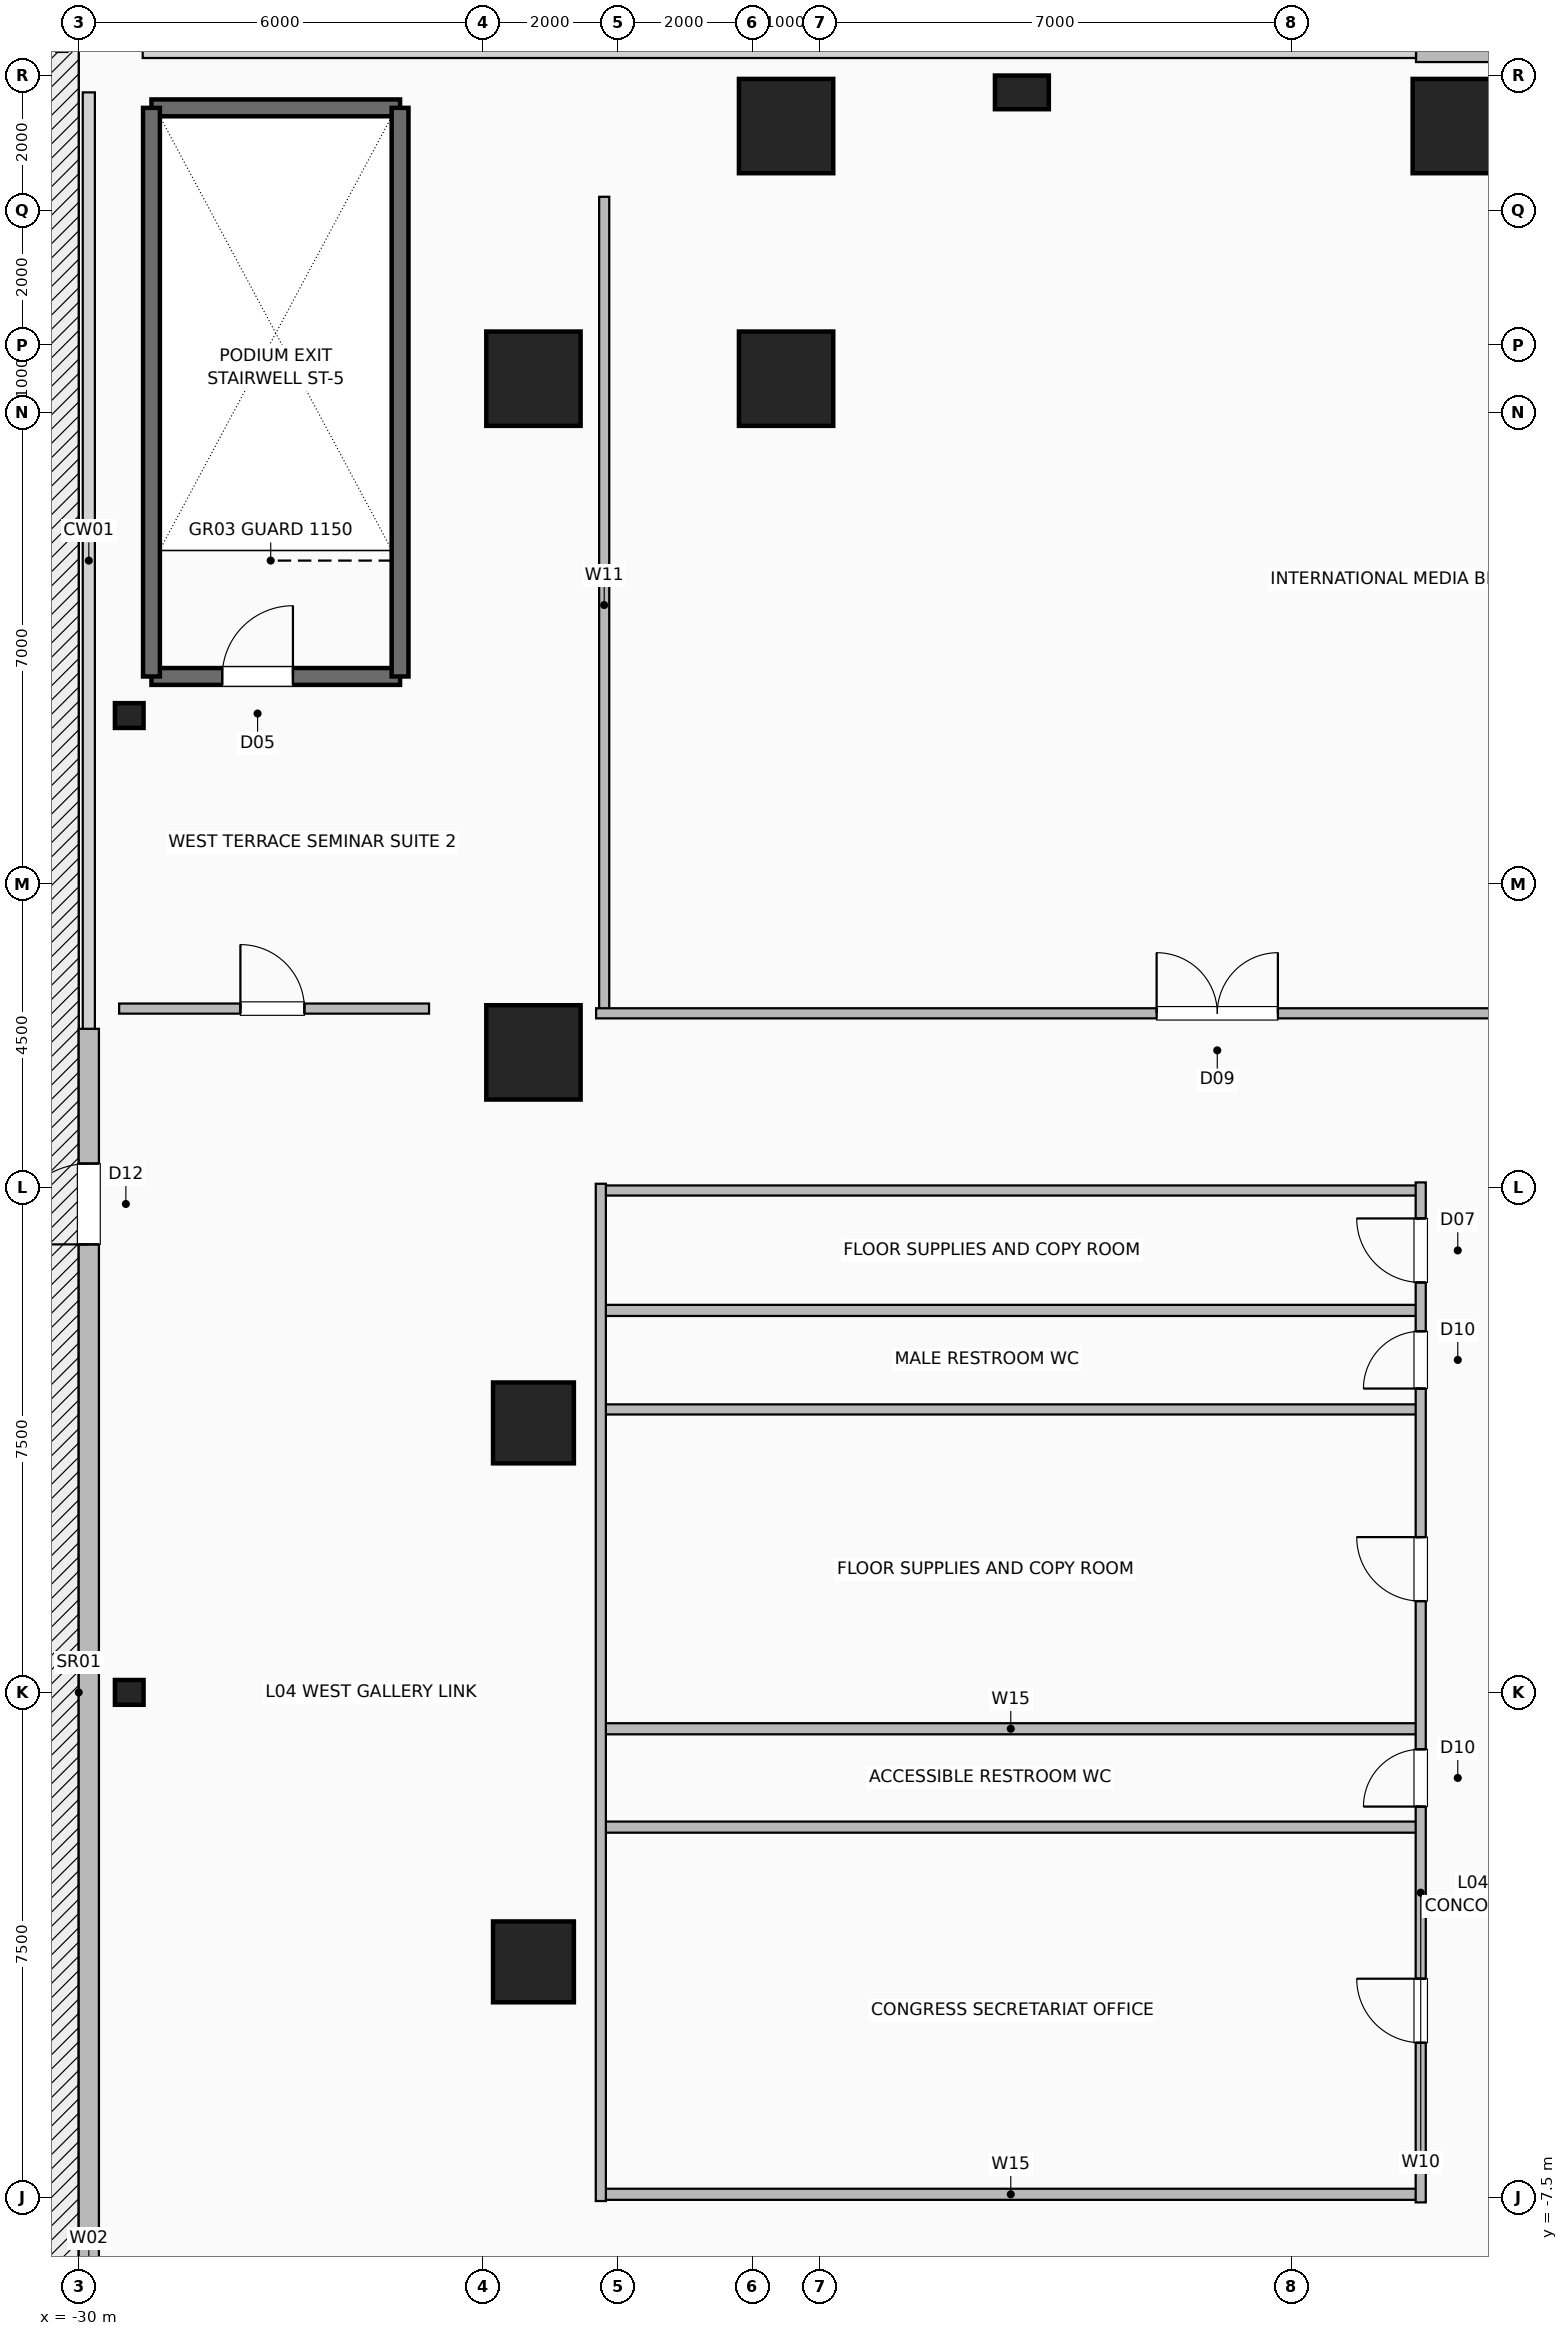
"""IFC4 building model, lengths in metres.
Left out: names, types, materials, properties, quantities, classifications, styles, units other than length and angle.
Written with IfcOpenShell. Run it as: python <this file> out.ifc"""

import sys

from ifc_helpers import new_model, si_unit, direction, frame, frame_2d, origin, origin_2d, place, context, subcontext, project, spatial, rectangle, hollow_rectangle, i_section, extrude, element, fill, save


model = new_model("IFC4")
c1 = context("Model", 3, precision=1e-05, world=origin(), true_north=direction((0.0, 1.0)))
c2 = subcontext(c1, "Body", "Model", "MODEL_VIEW")
j1 = project(units=[si_unit("LENGTHUNIT", "METRE"), si_unit("PLANEANGLEUNIT", "RADIAN")], contexts=[c1])
p1 = place(None, origin())
s1 = spatial("IfcSite", under=j1, at=p1, CompositionType="ELEMENT")
p2 = place(p1, origin())
s2 = spatial("IfcBuilding", under=s1, at=p2, CompositionType="ELEMENT")
p3 = place(p2, frame((0.0, 0.0, 21.6)))
s3 = spatial("IfcBuildingStorey", under=s2, at=p3, CompositionType="ELEMENT", Elevation=21.6)
p4 = place(p3, frame((-19.5, 23.25, 0.0), z_axis=(0.0, 0.0, 1.0), x_axis=(1.0, 0.0, 0.0)))
e1 = element("IfcColumn", 1, at=p4, inside=s3, PredefinedType="COLUMN", context=c2, shape_type="SweptSolid", body=[
    extrude(hollow_rectangle(XDim=1.4, YDim=1.4, WallThickness=0.06, at=origin_2d()), origin(), (0.0, 0.0, 1.0), 5.4),
])
for number, where, z_axis, x_axis in (
    (2, (-9.5, 23.25, 0.0), (0.0, 0.0, 1.0), (1.0, 0.0, 0.0)),
    (3, (-23.25, 9.5, 0.0), (0.0, 0.0, 1.0), (1.0, 0.0, 0.0)),
):
    element("IfcColumn", number, at=place(p3, frame(where, z_axis=z_axis, x_axis=x_axis)), inside=s3, PredefinedType="COLUMN", context=c2, shape_type="SweptSolid", body=[
        extrude(hollow_rectangle(XDim=1.4, YDim=1.4, WallThickness=0.06, at=origin_2d()), origin(), (0.0, 0.0, 1.0), 5.0),
    ])
for number, where, z_axis, x_axis in (
    (4, (-23.25, 19.5, 0.0), (0.0, 0.0, 1.0), (1.0, 0.0, 0.0)),
    (5, (-19.5, 19.5, 0.0), (0.0, 0.0, 1.0), (1.0, 0.0, 0.0)),
):
    element("IfcColumn", number, at=place(p3, frame(where, z_axis=z_axis, x_axis=x_axis)), inside=s3, PredefinedType="COLUMN", context=c2, shape_type="SweptSolid", body=[
        extrude(hollow_rectangle(XDim=1.4, YDim=1.4, WallThickness=0.06, at=origin_2d()), origin(), (0.0, 0.0, 1.0), 5.4),
    ])
for number, where, z_axis, x_axis in (
    (6, (-23.25, -4.0, -0.4), (0.0, 0.0, 1.0), (1.0, 0.0, 0.0)),
    (7, (-23.25, 4.0, -0.4), (0.0, 0.0, 1.0), (1.0, 0.0, 0.0)),
):
    element("IfcColumn", number, at=place(p3, frame(where, z_axis=z_axis, x_axis=x_axis)), inside=s3, PredefinedType="COLUMN", context=c2, shape_type="SweptSolid", body=[
        extrude(hollow_rectangle(XDim=1.2, YDim=1.2, WallThickness=0.055, at=origin_2d()), origin(), (0.0, 0.0, 1.0), 5.8),
    ])
for number, where, z_axis, x_axis in (
    (8, (-29.25, 0.0, 0.0), (0.0, 0.0, 1.0), (1.0, 0.0, 0.0)),
    (9, (-29.25, 14.5, 0.0), (0.0, 0.0, 1.0), (1.0, 0.0, 0.0)),
):
    element("IfcColumn", number, at=place(p3, frame(where, z_axis=z_axis, x_axis=x_axis)), inside=s3, PredefinedType="COLUMN", context=c2, shape_type="SweptSolid", body=[
        extrude(i_section(OverallWidth=0.368, OverallDepth=0.425, WebThickness=0.03, FlangeThickness=0.048, FilletRadius=0.02, at=origin_2d()), origin(), (0.0, 0.0, 1.0), 5.0),
    ])
p5 = place(p3, frame((-16.0, 23.75, 0.0), z_axis=(0.0, 0.0, 1.0), x_axis=(1.0, 0.0, 0.0)))
e10 = element("IfcColumn", 10, at=p5, inside=s3, PredefinedType="PILASTER", context=c2, shape_type="SweptSolid", body=[
    extrude(rectangle(XDim=0.5, YDim=0.8, at=origin_2d()), origin(), (0.0, 0.0, 1.0), 5.0),
])
p6 = place(p3, frame((-29.85, -23.75, 0.0), z_axis=(0.0, 0.0, 1.0), x_axis=(0.0, 1.0, 0.0)))
e11 = element("IfcWall", 11, at=p6, inside=s3, PredefinedType="SOLIDWALL", context=c2, shape_type="SweptSolid", body=[
    extrude(rectangle(XDim=33.6, YDim=0.3, at=frame_2d((16.8, 0.0))), origin(), (0.0, 0.0, 1.0), 5.0),
])
p7 = place(p6, frame((30.4, 0.0, 0.0)))
e12 = element("IfcOpeningElement", 12, at=p7, cuts=e11, PredefinedType="OPENING", context=c2, shape_type="SweptSolid", body=[
    extrude(rectangle(XDim=1.2, YDim=2.25, at=frame_2d((0.6, 1.125))), frame((0.0, 0.16, 0.0), z_axis=(0.0, -1.0, 0.0), x_axis=(1.0, 0.0, 0.0)), (0.0, 0.0, 1.0), 0.32),
])
p8 = place(p3, frame((-10.15, 24.35, 0.0), z_axis=(0.0, 0.0, 1.0), x_axis=(1.0, 0.0, 0.0)))
e13 = element("IfcWall", 13, at=p8, inside=s3, PredefinedType="SOLIDWALL", context=c2, shape_type="SweptSolid", body=[
    extrude(rectangle(XDim=25.5, YDim=0.3, at=frame_2d((12.75, 0.0))), origin(), (0.0, 0.0, 1.0), 5.0),
])
p9 = place(p8, frame((22.3, 0.0, 0.0)))
e14 = element("IfcOpeningElement", 14, at=p9, cuts=e13, PredefinedType="OPENING", context=c2, shape_type="SweptSolid", body=[
    extrude(rectangle(XDim=1.2, YDim=2.25, at=frame_2d((0.6, 1.125))), frame((0.0, 0.16, 0.0), z_axis=(0.0, -1.0, 0.0), x_axis=(1.0, 0.0, 0.0)), (0.0, 0.0, 1.0), 0.32),
])
p10 = place(p3, frame((-28.92, 15.08, 0.0), z_axis=(0.0, 0.0, 1.0), x_axis=(1.0, 0.0, 0.0)))
e15 = element("IfcWall", 15, at=p10, inside=s3, PredefinedType="SHEAR", context=c2, shape_type="SweptSolid", body=[
    extrude(rectangle(XDim=3.69, YDim=0.25, at=frame_2d((1.845, 0.0))), origin(), (0.0, 0.0, 1.0), 5.0),
])
p11 = place(p10, frame((1.05, 0.0, 0.0)))
e16 = element("IfcOpeningElement", 16, at=p11, cuts=e15, PredefinedType="OPENING", context=c2, shape_type="SweptSolid", body=[
    extrude(rectangle(XDim=1.05, YDim=2.08, at=frame_2d((0.525, 1.04))), frame((0.0, 0.135, 0.0), z_axis=(0.0, -1.0, 0.0), x_axis=(1.0, 0.0, 0.0)), (0.0, 0.0, 1.0), 0.27),
])
p12 = place(p3, frame((-28.92, 23.52, 0.0), z_axis=(0.0, 0.0, 1.0), x_axis=(1.0, 0.0, 0.0)))
e17 = element("IfcWall", 17, at=p12, inside=s3, PredefinedType="SHEAR", context=c2, shape_type="SweptSolid", body=[
    extrude(rectangle(XDim=3.69, YDim=0.25, at=frame_2d((1.845, 0.0))), origin(), (0.0, 0.0, 1.0), 5.0),
])
for number, where, z_axis, x_axis in (
    (18, (-28.92, 15.08, 0.0), (0.0, 0.0, 1.0), (0.0, 1.0, 0.0)),
    (19, (-25.23, 15.08, 0.0), (0.0, 0.0, 1.0), (0.0, 1.0, 0.0)),
):
    element("IfcWall", number, at=place(p3, frame(where, z_axis=z_axis, x_axis=x_axis)), inside=s3, PredefinedType="SHEAR", context=c2, shape_type="SweptSolid", body=[
        extrude(rectangle(XDim=8.44, YDim=0.25, at=frame_2d((4.22, 0.0))), origin(), (0.0, 0.0, 1.0), 5.0),
    ])
p13 = place(p3, frame((-22.2, 10.08, 0.0), z_axis=(0.0, 0.0, 1.0), x_axis=(0.0, 1.0, 0.0)))
e20 = element("IfcWall", 20, at=p13, inside=s3, PredefinedType="PARTITIONING", context=c2, shape_type="SweptSolid", body=[
    extrude(rectangle(XDim=12.12, YDim=0.15, at=frame_2d((6.06, 0.0))), origin(), (0.0, 0.0, 1.0), 5.0),
])
p14 = place(p3, frame((-22.32, 10.08, 0.0), z_axis=(0.0, 0.0, 1.0), x_axis=(1.0, 0.0, 0.0)))
e21 = element("IfcWall", 21, at=p14, inside=s3, PredefinedType="PARTITIONING", context=c2, shape_type="SweptSolid", body=[
    extrude(rectangle(XDim=44.64, YDim=0.15, at=frame_2d((22.32, 0.0))), origin(), (0.0, 0.0, 1.0), 5.0),
])
p15 = place(p14, frame((8.32, 0.0, 0.0)))
e22 = element("IfcOpeningElement", 22, at=p15, cuts=e21, PredefinedType="OPENING", context=c2, shape_type="SweptSolid", body=[
    extrude(rectangle(XDim=1.8, YDim=2.08, at=frame_2d((0.9, 1.04))), frame((0.0, 0.085, 0.0), z_axis=(0.0, -1.0, 0.0), x_axis=(1.0, 0.0, 0.0)), (0.0, 0.0, 1.0), 0.17),
])
p16 = place(p14, frame((23.345, 0.0, 0.0)))
e23 = element("IfcOpeningElement", 23, at=p16, cuts=e21, PredefinedType="OPENING", context=c2, shape_type="SweptSolid", body=[
    extrude(rectangle(XDim=0.95, YDim=2.06, at=frame_2d((0.475, 1.03))), frame((0.0, 0.085, 0.0), z_axis=(0.0, -1.0, 0.0), x_axis=(1.0, 0.0, 0.0)), (0.0, 0.0, 1.0), 0.17),
])
p17 = place(p14, frame((36.02, 0.0, 0.0)))
e24 = element("IfcOpeningElement", 24, at=p17, cuts=e21, PredefinedType="OPENING", context=c2, shape_type="SweptSolid", body=[
    extrude(rectangle(XDim=1.8, YDim=2.08, at=frame_2d((0.9, 1.04))), frame((0.0, 0.085, 0.0), z_axis=(0.0, -1.0, 0.0), x_axis=(1.0, 0.0, 0.0)), (0.0, 0.0, 1.0), 0.17),
])
for number, where, z_axis, x_axis in (
    (25, (-22.25, -0.54, 0.0), (0.0, 0.0, 1.0), (1.0, 0.0, 0.0)),
    (26, (-22.25, 5.67, 0.0), (0.0, 0.0, 1.0), (1.0, 0.0, 0.0)),
    (27, (-22.25, -7.45, 0.0), (0.0, 0.0, 1.0), (1.0, 0.0, 0.0)),
    (28, (-22.25, -2.0, 0.0), (0.0, 0.0, 1.0), (1.0, 0.0, 0.0)),
):
    element("IfcWall", number, at=place(p3, frame(where, z_axis=z_axis, x_axis=x_axis)), inside=s3, PredefinedType="PLUMBINGWALL", context=c2, shape_type="SweptSolid", body=[
        extrude(rectangle(XDim=12.17, YDim=0.165, at=frame_2d((6.085, 0.0))), origin(), (0.0, 0.0, 1.0), 5.0),
    ])
p18 = place(p3, frame((-22.25, 4.2, 0.0), z_axis=(0.0, 0.0, 1.0), x_axis=(1.0, 0.0, 0.0)))
e29 = element("IfcWall", 29, at=p18, inside=s3, PredefinedType="PARTITIONING", context=c2, shape_type="SweptSolid", body=[
    extrude(rectangle(XDim=12.17, YDim=0.15, at=frame_2d((6.085, 0.0))), origin(), (0.0, 0.0, 1.0), 3.375),
])
p19 = place(p3, frame((-22.25, 7.45, 0.0), z_axis=(0.0, 0.0, 1.0), x_axis=(1.0, 0.0, 0.0)))
e30 = element("IfcWall", 30, at=p19, inside=s3, PredefinedType="PARTITIONING", context=c2, shape_type="SweptSolid", body=[
    extrude(rectangle(XDim=12.17, YDim=0.15, at=frame_2d((6.085, 0.0))), origin(), (0.0, 0.0, 1.0), 5.0),
])
p20 = place(p3, frame((-10.08, -7.57, 0.0), z_axis=(0.0, 0.0, 1.0), x_axis=(0.0, 1.0, 0.0)))
e31 = element("IfcWall", 31, at=p20, inside=s3, PredefinedType="PARTITIONING", context=c2, shape_type="SweptSolid", body=[
    extrude(rectangle(XDim=15.14, YDim=0.15, at=frame_2d((7.57, 0.0))), origin(), (0.0, 0.0, 1.0), 5.0),
])
p21 = place(p20, frame((2.37, 0.0, 0.0)))
e32 = element("IfcOpeningElement", 32, at=p21, cuts=e31, PredefinedType="OPENING", context=c2, shape_type="SweptSolid", body=[
    extrude(rectangle(XDim=0.95, YDim=2.06, at=frame_2d((0.475, 1.03))), frame((0.0, 0.085, 0.0), z_axis=(0.0, -1.0, 0.0), x_axis=(1.0, 0.0, 0.0)), (0.0, 0.0, 1.0), 0.17),
])
p22 = place(p20, frame((5.875, 0.0, 0.0)))
e33 = element("IfcOpeningElement", 33, at=p22, cuts=e31, PredefinedType="OPENING", context=c2, shape_type="SweptSolid", body=[
    extrude(rectangle(XDim=0.85, YDim=2.05, at=frame_2d((0.425, 1.025))), frame((0.0, 0.085, 0.0), z_axis=(0.0, -1.0, 0.0), x_axis=(1.0, 0.0, 0.0)), (0.0, 0.0, 1.0), 0.17),
])
p23 = place(p20, frame((8.925, 0.0, 0.0)))
e34 = element("IfcOpeningElement", 34, at=p23, cuts=e31, PredefinedType="OPENING", context=c2, shape_type="SweptSolid", body=[
    extrude(rectangle(XDim=0.95, YDim=2.06, at=frame_2d((0.475, 1.03))), frame((0.0, 0.085, 0.0), z_axis=(0.0, -1.0, 0.0), x_axis=(1.0, 0.0, 0.0)), (0.0, 0.0, 1.0), 0.17),
])
p24 = place(p20, frame((12.08, 0.0, 0.0)))
e35 = element("IfcOpeningElement", 35, at=p24, cuts=e31, PredefinedType="OPENING", context=c2, shape_type="SweptSolid", body=[
    extrude(rectangle(XDim=0.85, YDim=2.05, at=frame_2d((0.425, 1.025))), frame((0.0, 0.085, 0.0), z_axis=(0.0, -1.0, 0.0), x_axis=(1.0, 0.0, 0.0)), (0.0, 0.0, 1.0), 0.17),
])
p25 = place(p20, frame((13.655, 0.0, 0.0)))
e36 = element("IfcOpeningElement", 36, at=p25, cuts=e31, PredefinedType="OPENING", context=c2, shape_type="SweptSolid", body=[
    extrude(rectangle(XDim=0.95, YDim=2.06, at=frame_2d((0.475, 1.03))), frame((0.0, 0.085, 0.0), z_axis=(0.0, -1.0, 0.0), x_axis=(1.0, 0.0, 0.0)), (0.0, 0.0, 1.0), 0.17),
])
p26 = place(p3, frame((-29.4, 10.15, 0.0), z_axis=(0.0, 0.0, 1.0), x_axis=(1.0, 0.0, 0.0)))
e37 = element("IfcWall", 37, at=p26, inside=s3, PredefinedType="PARTITIONING", context=c2, shape_type="SweptSolid", body=[
    extrude(rectangle(XDim=4.6, YDim=0.15, at=frame_2d((2.3, 0.0))), origin(), (0.0, 0.0, 1.0), 5.0),
])
p27 = place(p26, frame((1.8, 0.0, 0.0)))
e38 = element("IfcOpeningElement", 38, at=p27, cuts=e37, PredefinedType="OPENING", context=c2, shape_type="SweptSolid", body=[
    extrude(rectangle(XDim=0.95, YDim=2.06, at=frame_2d((0.475, 1.03))), frame((0.0, 0.085, 0.0), z_axis=(0.0, -1.0, 0.0), x_axis=(1.0, 0.0, 0.0)), (0.0, 0.0, 1.0), 0.17),
])
p28 = place(p3, frame((-22.25, -7.55, 0.0), z_axis=(0.0, 0.0, 1.0), x_axis=(0.0, 1.0, 0.0)))
e39 = element("IfcWall", 39, at=p28, inside=s3, PredefinedType="PARTITIONING", context=c2, shape_type="SweptSolid", body=[
    extrude(rectangle(XDim=15.1, YDim=0.15, at=frame_2d((7.55, 0.0))), origin(), (0.0, 0.0, 1.0), 5.0),
])
p29 = place(p7, origin())
e40 = element("IfcDoor", 40, at=p29, inside=s3, OperationType="SINGLE_SWING_LEFT", PredefinedType="DOOR", context=c2, shape_type="SweptSolid", body=[
    extrude(rectangle(XDim=1.2, YDim=2.25, at=frame_2d((0.6, 1.125))), frame((0.0, 0.025, 0.0), z_axis=(0.0, -1.0, 0.0), x_axis=(1.0, 0.0, 0.0)), (0.0, 0.0, 1.0), 0.05),
])
fill(e12, e40)
p30 = place(p11, origin())
e41 = element("IfcDoor", 41, at=p30, inside=s3, OperationType="SINGLE_SWING_RIGHT", PredefinedType="DOOR", context=c2, shape_type="SweptSolid", body=[
    extrude(rectangle(XDim=1.05, YDim=2.08, at=frame_2d((0.525, 1.04))), frame((0.0, 0.025, 0.0), z_axis=(0.0, -1.0, 0.0), x_axis=(1.0, 0.0, 0.0)), (0.0, 0.0, 1.0), 0.05),
])
fill(e16, e41)
p31 = place(p15, origin())
e42 = element("IfcDoor", 42, at=p31, inside=s3, OperationType="DOUBLE_DOOR_SINGLE_SWING", PredefinedType="DOOR", context=c2, shape_type="SweptSolid", body=[
    extrude(rectangle(XDim=1.8, YDim=2.08, at=frame_2d((0.9, 1.04))), frame((0.0, 0.025, 0.0), z_axis=(0.0, -1.0, 0.0), x_axis=(1.0, 0.0, 0.0)), (0.0, 0.0, 1.0), 0.05),
])
fill(e22, e42)
p32 = place(p21, origin())
e43 = element("IfcDoor", 43, at=p32, inside=s3, OperationType="SINGLE_SWING_RIGHT", PredefinedType="DOOR", context=c2, shape_type="SweptSolid", body=[
    extrude(rectangle(XDim=0.95, YDim=2.06, at=frame_2d((0.475, 1.03))), frame((0.0, 0.025, 0.0), z_axis=(0.0, -1.0, 0.0), x_axis=(1.0, 0.0, 0.0)), (0.0, 0.0, 1.0), 0.05),
])
fill(e32, e43)
p33 = place(p22, origin())
e44 = element("IfcDoor", 44, at=p33, inside=s3, OperationType="SINGLE_SWING_LEFT", PredefinedType="DOOR", context=c2, shape_type="SweptSolid", body=[
    extrude(rectangle(XDim=0.85, YDim=2.05, at=frame_2d((0.425, 1.025))), frame((0.0, 0.025, 0.0), z_axis=(0.0, -1.0, 0.0), x_axis=(1.0, 0.0, 0.0)), (0.0, 0.0, 1.0), 0.05),
])
fill(e33, e44)
p34 = place(p23, origin())
e45 = element("IfcDoor", 45, at=p34, inside=s3, OperationType="SINGLE_SWING_RIGHT", PredefinedType="DOOR", context=c2, shape_type="SweptSolid", body=[
    extrude(rectangle(XDim=0.95, YDim=2.06, at=frame_2d((0.475, 1.03))), frame((0.0, 0.025, 0.0), z_axis=(0.0, -1.0, 0.0), x_axis=(1.0, 0.0, 0.0)), (0.0, 0.0, 1.0), 0.05),
])
fill(e34, e45)
p35 = place(p24, origin())
e46 = element("IfcDoor", 46, at=p35, inside=s3, OperationType="SINGLE_SWING_LEFT", PredefinedType="DOOR", context=c2, shape_type="SweptSolid", body=[
    extrude(rectangle(XDim=0.85, YDim=2.05, at=frame_2d((0.425, 1.025))), frame((0.0, 0.025, 0.0), z_axis=(0.0, -1.0, 0.0), x_axis=(1.0, 0.0, 0.0)), (0.0, 0.0, 1.0), 0.05),
])
fill(e35, e46)
p36 = place(p25, origin())
e47 = element("IfcDoor", 47, at=p36, inside=s3, OperationType="SINGLE_SWING_RIGHT", PredefinedType="DOOR", context=c2, shape_type="SweptSolid", body=[
    extrude(rectangle(XDim=0.95, YDim=2.06, at=frame_2d((0.475, 1.03))), frame((0.0, 0.025, 0.0), z_axis=(0.0, -1.0, 0.0), x_axis=(1.0, 0.0, 0.0)), (0.0, 0.0, 1.0), 0.05),
])
fill(e36, e47)
p37 = place(p27, origin())
e48 = element("IfcDoor", 48, at=p37, inside=s3, OperationType="SINGLE_SWING_LEFT", PredefinedType="DOOR", context=c2, shape_type="SweptSolid", body=[
    extrude(rectangle(XDim=0.95, YDim=2.06, at=frame_2d((0.475, 1.03))), frame((0.0, 0.025, 0.0), z_axis=(0.0, -1.0, 0.0), x_axis=(1.0, 0.0, 0.0)), (0.0, 0.0, 1.0), 0.05),
])
fill(e38, e48)
save(model, sys.argv[1])
